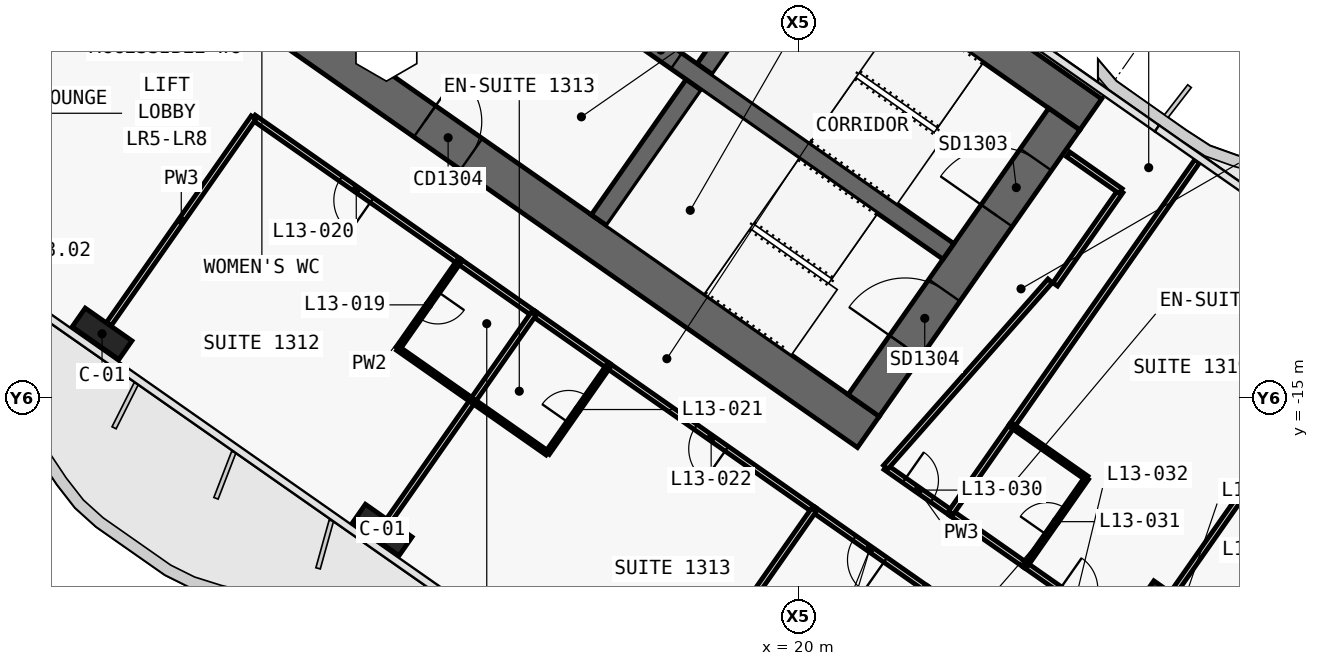
"""IFC4 building model, lengths in metres.
Left out: names, types, materials, properties, quantities, classifications, styles, units other than length and angle.
Written with IfcOpenShell. Run it as: python <this file> out.ifc"""

import sys

from ifc_helpers import new_model, si_unit, direction, frame, frame_2d, origin, origin_2d, place, context, subcontext, project, spatial, polyline, rectangle, outline, extrude, element, fill, save


model = new_model("IFC4")
c1 = context("Model", 3, precision=1e-05, world=origin(), true_north=direction((0.0, 1.0)))
c2 = subcontext(c1, "Body", "Model", "MODEL_VIEW")
j1 = project(units=[si_unit("LENGTHUNIT", "METRE"), si_unit("PLANEANGLEUNIT", "RADIAN")], contexts=[c1])
p1 = place(None, origin())
s1 = spatial("IfcSite", under=j1, at=p1, CompositionType="ELEMENT")
p2 = place(p1, origin())
s2 = spatial("IfcBuilding", under=s1, at=p2, CompositionType="ELEMENT")
p3 = place(p2, frame((0.0, 0.0, 72.5)))
s3 = spatial("IfcBuildingStorey", under=s2, at=p3, CompositionType="ELEMENT", Elevation=72.5)
p4 = place(p3, frame((-0.037, 11.867, 0.0), z_axis=(0.0, 0.0, 1.0), x_axis=(0.819155306259, -0.573571777746, 0.0)))
e1 = element("IfcWall", 1, at=p4, inside=s3, PredefinedType="SHEAR", context=c2, shape_type="SweptSolid", body=[
    extrude(outline(polyline([(33.837, 0.5), (0.0, 0.5), (0.7, -0.5), (33.837, -0.5), (33.837, 0.5)])), origin(), (0.0, 0.0, 1.0), 3.6),
])
p5 = place(p3, frame((-0.037, -0.585, 0.0), z_axis=(0.0, 0.0, 1.0), x_axis=(0.819157152511, -0.573569140985, 0.0)))
e2 = element("IfcWall", 2, at=p5, inside=s3, PredefinedType="SHEAR", context=c2, shape_type="SweptSolid", body=[
    extrude(outline(polyline([(26.695, 0.5), (0.0, 0.5), (0.7, -0.5), (26.695, -0.5), (26.695, 0.5)])), origin(), (0.0, 0.0, 1.0), 3.6),
])
p6 = place(p5, frame((1.045, 0.0, 0.0)))
e3 = element("IfcOpeningElement", 3, at=p6, cuts=e2, PredefinedType="OPENING", context=c2, shape_type="SweptSolid", body=[
    extrude(rectangle(XDim=1.5, YDim=2.1, at=frame_2d((0.75, 1.05))), frame((0.0, 0.51, 0.0), z_axis=(0.0, -1.0, 0.0), x_axis=(1.0, 0.0, 0.0)), (0.0, 0.0, 1.0), 1.02),
])
p7 = place(p5, frame((12.445, 0.0, 0.0)))
e4 = element("IfcOpeningElement", 4, at=p7, cuts=e2, PredefinedType="OPENING", context=c2, shape_type="SweptSolid", body=[
    extrude(rectangle(XDim=1.5, YDim=2.1, at=frame_2d((0.75, 1.05))), frame((0.0, 0.51, 0.0), z_axis=(0.0, -1.0, 0.0), x_axis=(1.0, 0.0, 0.0)), (0.0, 0.0, 1.0), 1.02),
])
p8 = place(p3, frame((21.708, -15.2, 0.0), z_axis=(0.0, 0.0, 1.0), x_axis=(0.573576324356, 0.819152122709, 0.0)))
e5 = element("IfcWall", 5, at=p8, inside=s3, PredefinedType="SHEAR", context=c2, shape_type="SweptSolid", body=[
    extrude(outline(polyline([(9.2, 0.5), (0.0, 0.5), (0.0, -0.5), (9.2, -0.5), (9.2, 0.5)])), origin(), (0.0, 0.0, 1.0), 3.6),
])
p9 = place(p8, frame((6.1, 0.0, 0.0)))
e6 = element("IfcOpeningElement", 6, at=p9, cuts=e5, PredefinedType="OPENING", context=c2, shape_type="SweptSolid", body=[
    extrude(rectangle(XDim=1.8, YDim=2.1, at=frame_2d((0.9, 1.05))), frame((0.0, 0.51, 0.0), z_axis=(0.0, -1.0, 0.0), x_axis=(1.0, 0.0, 0.0)), (0.0, 0.0, 1.0), 1.02),
])
p10 = place(p8, frame((1.9, 0.0, 0.0)))
e7 = element("IfcOpeningElement", 7, at=p10, cuts=e5, PredefinedType="OPENING", context=c2, shape_type="SweptSolid", body=[
    extrude(rectangle(XDim=1.8, YDim=2.1, at=frame_2d((0.9, 1.05))), frame((0.0, 0.51, 0.0), z_axis=(0.0, -1.0, 0.0), x_axis=(1.0, 0.0, 0.0)), (0.0, 0.0, 1.0), 1.02),
])
p11 = place(p3, frame((14.745, -10.324, 0.0), z_axis=(0.0, 0.0, 1.0), x_axis=(0.57356780395, 0.819158088694, 0.0)))
e8 = element("IfcWall", 8, at=p11, inside=s3, PredefinedType="SHEAR", context=c2, shape_type="SweptSolid", body=[
    extrude(outline(polyline([(0.0, 0.25), (0.0, -0.25), (4.35, -0.25), (4.35, 0.25), (0.0, 0.25)])), origin(), (0.0, 0.0, 1.0), 3.6),
])
p12 = place(p3, frame((17.527, -6.352, 0.0), z_axis=(0.0, 0.0, 1.0), x_axis=(0.573530143085, 0.819184457233, 0.0)))
e9 = element("IfcWall", 9, at=p12, inside=s3, PredefinedType="SHEAR", context=c2, shape_type="SweptSolid", body=[
    extrude(outline(polyline([(4.35, -0.25), (4.35, 0.25), (0.0, 0.25), (0.0, -0.25), (4.35, -0.25)])), origin(), (0.0, 0.0, 1.0), 3.6),
])
p13 = place(p3, frame((2.638, 3.768, 0.0), z_axis=(0.0, 0.0, 1.0), x_axis=(0.819148977158, -0.573580816643, 0.0)))
e10 = element("IfcWall", 10, at=p13, inside=s3, PredefinedType="SHEAR", context=c2, shape_type="SweptSolid", body=[
    extrude(outline(polyline([(0.0, 0.25), (0.0, -0.25), (26.0, -0.25), (26.0, 0.25), (0.0, 0.25)])), origin(), (0.0, 0.0, 1.0), 3.6),
])
p14 = place(p13, frame((9.637, 0.0, 0.0)))
e11 = element("IfcOpeningElement", 11, at=p14, cuts=e10, PredefinedType="OPENING", context=c2, shape_type="SweptSolid", body=[
    extrude(rectangle(XDim=1.2, YDim=2.1, at=frame_2d((0.6, 1.05))), frame((0.0, 0.26, 0.0), z_axis=(0.0, -1.0, 0.0), x_axis=(1.0, 0.0, 0.0)), (0.0, 0.0, 1.0), 0.52),
])
p15 = place(p13, frame((11.812, 0.0, 0.0)))
e12 = element("IfcOpeningElement", 12, at=p15, cuts=e10, PredefinedType="OPENING", context=c2, shape_type="SweptSolid", body=[
    extrude(rectangle(XDim=1.2, YDim=2.1, at=frame_2d((0.6, 1.05))), frame((0.0, 0.26, 0.0), z_axis=(0.0, -1.0, 0.0), x_axis=(1.0, 0.0, 0.0)), (0.0, 0.0, 1.0), 0.52),
])
p16 = place(p13, frame((13.988, 0.0, 0.0)))
e13 = element("IfcOpeningElement", 13, at=p16, cuts=e10, PredefinedType="OPENING", context=c2, shape_type="SweptSolid", body=[
    extrude(rectangle(XDim=1.2, YDim=2.1, at=frame_2d((0.6, 1.05))), frame((0.0, 0.26, 0.0), z_axis=(0.0, -1.0, 0.0), x_axis=(1.0, 0.0, 0.0)), (0.0, 0.0, 1.0), 0.52),
])
p17 = place(p13, frame((16.262, 0.0, 0.0)))
e14 = element("IfcOpeningElement", 14, at=p17, cuts=e10, PredefinedType="OPENING", context=c2, shape_type="SweptSolid", body=[
    extrude(rectangle(XDim=1.0, YDim=2.1, at=frame_2d((0.5, 1.05))), frame((0.0, 0.26, 0.0), z_axis=(0.0, -1.0, 0.0), x_axis=(1.0, 0.0, 0.0)), (0.0, 0.0, 1.0), 0.52),
])
for number, where, z_axis, x_axis in (
    (15, (1.665, -13.313, 0.0), (0.0, 0.0, 1.0), (0.819, -0.574, 0.0)),
    (16, (9.038, -18.475, 0.0), (0.0, 0.0, 1.0), (0.819, -0.574, 0.0)),
):
    element("IfcColumn", number, at=place(p3, frame(where, z_axis=z_axis, x_axis=x_axis)), inside=s3, PredefinedType="COLUMN", context=c2, shape_type="SweptSolid", body=[
        extrude(rectangle(XDim=1.5, YDim=0.6, at=origin_2d()), origin(), (0.0, 0.0, 1.0), 3.6),
    ])
p18 = place(p3, frame((29.49, -20.649, 0.0), z_axis=(0.0, 0.0, 1.0), x_axis=(0.819152044289, -0.573576436351, 0.0)))
e17 = element("IfcColumn", 17, at=p18, inside=s3, PredefinedType="COLUMN", context=c2, shape_type="SweptSolid", body=[
    extrude(rectangle(XDim=1.2, YDim=1.2, at=origin_2d()), origin(), (0.0, 0.0, 1.0), 3.6),
])
p19 = place(p3, frame((22.284, -16.824, 0.0), z_axis=(0.0, 0.0, 1.0), x_axis=(0.819160859995, -0.573563846013, 0.0)))
e18 = element("IfcWall", 18, at=p19, inside=s3, PredefinedType="PARTITIONING", context=c2, shape_type="SweptSolid", body=[
    extrude(rectangle(XDim=2.098, YDim=0.15, at=frame_2d((1.049, 0.0))), origin(), (0.0, 0.0, 1.0), 3.32),
])
p20 = place(p19, frame((0.599, 0.0, 0.0)))
e19 = element("IfcOpeningElement", 19, at=p20, cuts=e18, PredefinedType="OPENING", context=c2, shape_type="SweptSolid", body=[
    extrude(rectangle(XDim=0.9, YDim=2.1, at=frame_2d((0.45, 1.05))), frame((0.0, 0.085, 0.0), z_axis=(0.0, -1.0, 0.0), x_axis=(1.0, 0.0, 0.0)), (0.0, 0.0, 1.0), 0.17),
])
p21 = place(p3, frame((25.966, -19.403, 0.0), z_axis=(0.0, 0.0, 1.0), x_axis=(0.81917779803, -0.57353965444, 0.0)))
e20 = element("IfcWall", 20, at=p21, inside=s3, PredefinedType="PARTITIONING", context=c2, shape_type="SweptSolid", body=[
    extrude(rectangle(XDim=3.603, YDim=0.15, at=frame_2d((1.801, 0.0))), origin(), (0.0, 0.0, 1.0), 2.6),
])
p22 = place(p21, frame((1.101, 0.0, 0.0)))
e21 = element("IfcOpeningElement", 21, at=p22, cuts=e20, PredefinedType="OPENING", context=c2, shape_type="SweptSolid", body=[
    extrude(rectangle(XDim=1.0, YDim=2.1, at=frame_2d((0.5, 1.05))), frame((0.0, 0.085, 0.0), z_axis=(0.0, -1.0, 0.0), x_axis=(1.0, 0.0, 0.0)), (0.0, 0.0, 1.0), 0.17),
])
p23 = place(p3, frame((23.999, -18.025, 0.0), z_axis=(0.0, 0.0, 1.0), x_axis=(0.819146032251, -0.573585022335, 0.0)))
e22 = element("IfcWall", 22, at=p23, inside=s3, PredefinedType="PARTITIONING", context=c2, shape_type="SweptSolid", body=[
    extrude(rectangle(XDim=2.404, YDim=0.15, at=frame_2d((1.202, 0.0))), origin(), (0.0, 0.0, 1.0), 3.32),
])
p24 = place(p3, frame((11.059, -11.406, 0.0), z_axis=(0.0, 0.0, 1.0), x_axis=(-0.819155459934, 0.573571558274, 0.0)))
e23 = element("IfcWall", 23, at=p24, inside=s3, PredefinedType="PARTITIONING", context=c2, shape_type="SweptSolid", body=[
    extrude(rectangle(XDim=6.601, YDim=0.15, at=frame_2d((3.301, 0.0))), origin(), (0.0, 0.0, 1.0), 2.6),
])
p25 = place(p24, frame((2.801, 0.0, 0.0)))
e24 = element("IfcOpeningElement", 24, at=p25, cuts=e23, PredefinedType="OPENING", context=c2, shape_type="SweptSolid", body=[
    extrude(rectangle(XDim=1.0, YDim=2.1, at=frame_2d((0.5, 1.05))), frame((0.0, 0.085, 0.0), z_axis=(0.0, -1.0, 0.0), x_axis=(1.0, 0.0, 0.0)), (0.0, 0.0, 1.0), 0.17),
])
p26 = place(p3, frame((13.026, -12.783, 0.0), z_axis=(0.0, 0.0, 1.0), x_axis=(-0.819146032251, 0.573585022335, 0.0)))
e25 = element("IfcWall", 25, at=p26, inside=s3, PredefinedType="PARTITIONING", context=c2, shape_type="SweptSolid", body=[
    extrude(rectangle(XDim=2.404, YDim=0.15, at=frame_2d((1.202, 0.0))), origin(), (0.0, 0.0, 1.0), 2.6),
])
p27 = place(p3, frame((20.398, -17.945, 0.0), z_axis=(0.0, 0.0, 1.0), x_axis=(-0.819124209701, 0.57361618621, 0.0)))
e26 = element("IfcWall", 26, at=p27, inside=s3, PredefinedType="PARTITIONING", context=c2, shape_type="SweptSolid", body=[
    extrude(rectangle(XDim=6.603, YDim=0.15, at=frame_2d((3.302, 0.0))), origin(), (0.0, 0.0, 1.0), 2.6),
])
p28 = place(p27, frame((2.802, 0.0, 0.0)))
e27 = element("IfcOpeningElement", 27, at=p28, cuts=e26, PredefinedType="OPENING", context=c2, shape_type="SweptSolid", body=[
    extrude(rectangle(XDim=1.0, YDim=2.1, at=frame_2d((0.5, 1.05))), frame((0.0, 0.085, 0.0), z_axis=(0.0, -1.0, 0.0), x_axis=(1.0, 0.0, 0.0)), (0.0, 0.0, 1.0), 0.17),
])
p29 = place(p3, frame((14.992, -14.16, 0.0), z_axis=(0.0, 0.0, 1.0), x_axis=(-0.819146032251, 0.573585022335, 0.0)))
e28 = element("IfcWall", 28, at=p29, inside=s3, PredefinedType="PARTITIONING", context=c2, shape_type="SweptSolid", body=[
    extrude(rectangle(XDim=2.404, YDim=0.15, at=frame_2d((1.202, 0.0))), origin(), (0.0, 0.0, 1.0), 2.6),
])
p30 = place(p3, frame((23.346, -20.01, 0.0), z_axis=(0.0, 0.0, 1.0), x_axis=(-0.819145961204, 0.573585123798, 0.0)))
e29 = element("IfcWall", 29, at=p30, inside=s3, PredefinedType="PARTITIONING", context=c2, shape_type="SweptSolid", body=[
    extrude(rectangle(XDim=3.603, YDim=0.15, at=frame_2d((1.802, 0.0))), origin(), (0.0, 0.0, 1.0), 2.6),
])
p31 = place(p30, frame((1.301, 0.0, 0.0)))
e30 = element("IfcOpeningElement", 30, at=p31, cuts=e29, PredefinedType="OPENING", context=c2, shape_type="SweptSolid", body=[
    extrude(rectangle(XDim=1.0, YDim=2.1, at=frame_2d((0.5, 1.05))), frame((0.0, 0.085, 0.0), z_axis=(0.0, -1.0, 0.0), x_axis=(1.0, 0.0, 0.0)), (0.0, 0.0, 1.0), 0.17),
])
p32 = place(p3, frame((30.482, -8.77, 0.0), z_axis=(0.0, 0.0, 1.0), x_axis=(-0.573576058406, -0.819152308929, 0.0)))
e31 = element("IfcWall", 31, at=p32, inside=s3, PredefinedType="PARTITIONING", context=c2, shape_type="SweptSolid", body=[
    extrude(rectangle(XDim=8.501, YDim=0.15, at=frame_2d((4.25, 0.0))), origin(), (0.0, 0.0, 1.0), 2.6),
])
p33 = place(p3, frame((25.608, -15.731, 0.0), z_axis=(0.0, 0.0, 1.0), x_axis=(-0.573596837309, -0.819137759006, 0.0)))
e32 = element("IfcWall", 32, at=p33, inside=s3, PredefinedType="PARTITIONING", context=c2, shape_type="SweptSolid", body=[
    extrude(rectangle(XDim=2.802, YDim=0.15, at=frame_2d((1.401, 0.0))), origin(), (0.0, 0.0, 1.0), 2.6),
])
p34 = place(p3, frame((22.285, -16.825, 0.0), z_axis=(0.0, 0.0, 1.0), x_axis=(0.661551268245, 0.749899939647, 0.0)))
e33 = element("IfcWall", 33, at=p34, inside=s3, PredefinedType="PARTITIONING", context=c2, shape_type="SweptSolid", body=[
    extrude(rectangle(XDim=6.541, YDim=0.15, at=frame_2d((3.271, 0.0))), origin(), (0.0, 0.0, 1.0), 2.6),
])
p35 = place(p3, frame((26.746, -12.014, 0.0), z_axis=(0.0, 0.0, 1.0), x_axis=(0.573560650686, 0.819163097304, 0.0)))
e34 = element("IfcWall", 34, at=p35, inside=s3, PredefinedType="PARTITIONING", context=c2, shape_type="SweptSolid", body=[
    extrude(rectangle(XDim=3.0, YDim=0.15, at=frame_2d((1.5, 0.0))), origin(), (0.0, 0.0, 1.0), 3.32),
])
p36 = place(p3, frame((28.467, -9.556, 0.0), z_axis=(0.0, 0.0, 1.0), x_axis=(-0.819109000826, 0.573637903879, 0.0)))
e35 = element("IfcWall", 35, at=p36, inside=s3, PredefinedType="PARTITIONING", context=c2, shape_type="SweptSolid", body=[
    extrude(rectangle(XDim=1.68, YDim=0.15, at=frame_2d((0.84, 0.0))), origin(), (0.0, 0.0, 1.0), 3.32),
])
p37 = place(p3, frame((25.968, -19.404, 0.0), z_axis=(0.0, 0.0, 1.0), x_axis=(0.573591086599, 0.819141785879, 0.0)))
e36 = element("IfcWall", 36, at=p37, inside=s3, PredefinedType="PARTITIONING", context=c2, shape_type="SweptSolid", body=[
    extrude(rectangle(XDim=2.8, YDim=0.12, at=frame_2d((1.4, 0.0))), origin(), (0.0, 0.0, 1.0), 2.6),
])
p38 = place(p37, frame((0.975, 0.0, 0.0)))
e37 = element("IfcOpeningElement", 37, at=p38, cuts=e36, PredefinedType="OPENING", context=c2, shape_type="SweptSolid", body=[
    extrude(rectangle(XDim=0.85, YDim=2.05, at=frame_2d((0.425, 1.025))), frame((0.0, 0.07, 0.0), z_axis=(0.0, -1.0, 0.0), x_axis=(1.0, 0.0, 0.0)), (0.0, 0.0, 1.0), 0.14),
])
p39 = place(p3, frame((27.573, -17.109, 0.0), z_axis=(0.0, 0.0, 1.0), x_axis=(-0.819107643868, 0.573639841501, 0.0)))
e38 = element("IfcWall", 38, at=p39, inside=s3, PredefinedType="PARTITIONING", context=c2, shape_type="SweptSolid", body=[
    extrude(rectangle(XDim=2.4, YDim=0.12, at=frame_2d((1.2, 0.0))), origin(), (0.0, 0.0, 1.0), 3.32),
])
p40 = place(p3, frame((35.013, -12.76, 0.0), z_axis=(0.0, 0.0, 1.0), x_axis=(-0.573558725113, -0.819164445546, 0.0)))
e39 = element("IfcWall", 39, at=p40, inside=s3, PredefinedType="PARTITIONING", context=c2, shape_type="SweptSolid", body=[
    extrude(rectangle(XDim=9.01, YDim=0.15, at=frame_2d((4.505, 0.0))), origin(), (0.0, 0.0, 1.0), 2.6),
])
p41 = place(p3, frame((11.057, -11.405, 0.0), z_axis=(0.0, 0.0, 1.0), x_axis=(-0.573591086599, -0.819141785879, 0.0)))
e40 = element("IfcWall", 40, at=p41, inside=s3, PredefinedType="PARTITIONING", context=c2, shape_type="SweptSolid", body=[
    extrude(rectangle(XDim=2.8, YDim=0.12, at=frame_2d((1.4, 0.0))), origin(), (0.0, 0.0, 1.0), 3.32),
])
p42 = place(p41, frame((0.975, 0.0, 0.0)))
e41 = element("IfcOpeningElement", 41, at=p42, cuts=e40, PredefinedType="OPENING", context=c2, shape_type="SweptSolid", body=[
    extrude(rectangle(XDim=0.85, YDim=2.05, at=frame_2d((0.425, 1.025))), frame((0.0, 0.07, 0.0), z_axis=(0.0, -1.0, 0.0), x_axis=(1.0, 0.0, 0.0)), (0.0, 0.0, 1.0), 0.14),
])
p43 = place(p3, frame((9.451, -13.7, 0.0), z_axis=(0.0, 0.0, 1.0), x_axis=(0.819141114317, -0.573592045652, 0.0)))
e42 = element("IfcWall", 42, at=p43, inside=s3, PredefinedType="PARTITIONING", context=c2, shape_type="SweptSolid", body=[
    extrude(rectangle(XDim=2.4, YDim=0.12, at=frame_2d((1.2, 0.0))), origin(), (0.0, 0.0, 1.0), 2.6),
])
p44 = place(p3, frame((11.417, -15.076, 0.0), z_axis=(0.0, 0.0, 1.0), x_axis=(-0.573594994199, -0.819139049631, 0.0)))
e43 = element("IfcWall", 43, at=p44, inside=s3, PredefinedType="PARTITIONING", context=c2, shape_type="SweptSolid", body=[
    extrude(rectangle(XDim=3.829, YDim=0.15, at=frame_2d((1.915, 0.0))), origin(), (0.0, 0.0, 1.0), 2.6),
])
p45 = place(p3, frame((1.849, -13.051, 0.0), z_axis=(0.0, 0.0, 1.0), x_axis=(0.57357355307, 0.819154063177, 0.0)))
e44 = element("IfcWall", 44, at=p45, inside=s3, PredefinedType="PARTITIONING", context=c2, shape_type="SweptSolid", body=[
    extrude(rectangle(XDim=6.63, YDim=0.15, at=frame_2d((3.315, 0.0))), origin(), (0.0, 0.0, 1.0), 2.6),
])
p46 = place(p3, frame((13.024, -12.782, 0.0), z_axis=(0.0, 0.0, 1.0), x_axis=(-0.573550118428, -0.819170471667, 0.0)))
e45 = element("IfcWall", 45, at=p46, inside=s3, PredefinedType="PARTITIONING", context=c2, shape_type="SweptSolid", body=[
    extrude(rectangle(XDim=2.8, YDim=0.15, at=frame_2d((1.4, 0.0))), origin(), (0.0, 0.0, 1.0), 2.6),
])
p47 = place(p3, frame((11.417, -15.076, 0.0), z_axis=(0.0, 0.0, 1.0), x_axis=(0.819155442668, -0.573571582932, 0.0)))
e46 = element("IfcWall", 46, at=p47, inside=s3, PredefinedType="PARTITIONING", context=c2, shape_type="SweptSolid", body=[
    extrude(rectangle(XDim=2.4, YDim=0.12, at=frame_2d((1.2, 0.0))), origin(), (0.0, 0.0, 1.0), 2.6),
])
p48 = place(p3, frame((13.385, -16.453, 0.0), z_axis=(0.0, 0.0, 1.0), x_axis=(0.573550118428, 0.819170471667, 0.0)))
e47 = element("IfcWall", 47, at=p48, inside=s3, PredefinedType="PARTITIONING", context=c2, shape_type="SweptSolid", body=[
    extrude(rectangle(XDim=2.8, YDim=0.12, at=frame_2d((1.4, 0.0))), origin(), (0.0, 0.0, 1.0), 3.32),
])
p49 = place(p48, frame((0.975, 0.0, 0.0)))
e48 = element("IfcOpeningElement", 48, at=p49, cuts=e47, PredefinedType="OPENING", context=c2, shape_type="SweptSolid", body=[
    extrude(rectangle(XDim=0.85, YDim=2.05, at=frame_2d((0.425, 1.025))), frame((0.0, 0.07, 0.0), z_axis=(0.0, -1.0, 0.0), x_axis=(1.0, 0.0, 0.0)), (0.0, 0.0, 1.0), 0.14),
])
p50 = place(p3, frame((20.396, -17.944, 0.0), z_axis=(0.0, 0.0, 1.0), x_axis=(-0.57359826181, -0.819136761505, 0.0)))
e49 = element("IfcWall", 49, at=p50, inside=s3, PredefinedType="PARTITIONING", context=c2, shape_type="SweptSolid", body=[
    extrude(rectangle(XDim=6.63, YDim=0.15, at=frame_2d((3.315, 0.0))), origin(), (0.0, 0.0, 1.0), 2.6),
])
p51 = place(p17, origin())
e50 = element("IfcDoor", 50, at=p51, inside=s3, OperationType="SINGLE_SWING_RIGHT", PredefinedType="DOOR", context=c2, shape_type="SweptSolid", body=[
    extrude(rectangle(XDim=1.0, YDim=2.1, at=frame_2d((0.5, 1.05))), frame((0.0, 0.025, 0.0), z_axis=(0.0, -1.0, 0.0), x_axis=(1.0, 0.0, 0.0)), (0.0, 0.0, 1.0), 0.05),
])
fill(e14, e50)
p52 = place(p7, origin())
e51 = element("IfcDoor", 51, at=p52, inside=s3, OperationType="DOUBLE_DOOR_SINGLE_SWING", PredefinedType="DOOR", context=c2, shape_type="SweptSolid", body=[
    extrude(rectangle(XDim=1.5, YDim=2.1, at=frame_2d((0.75, 1.05))), frame((0.0, 0.025, 0.0), z_axis=(0.0, -1.0, 0.0), x_axis=(1.0, 0.0, 0.0)), (0.0, 0.0, 1.0), 0.05),
])
fill(e4, e51)
p53 = place(p9, origin())
e52 = element("IfcDoor", 52, at=p53, inside=s3, OperationType="DOUBLE_DOOR_SINGLE_SWING", PredefinedType="DOOR", context=c2, shape_type="SweptSolid", body=[
    extrude(rectangle(XDim=1.8, YDim=2.1, at=frame_2d((0.9, 1.05))), frame((0.0, 0.025, 0.0), z_axis=(0.0, -1.0, 0.0), x_axis=(1.0, 0.0, 0.0)), (0.0, 0.0, 1.0), 0.05),
])
fill(e6, e52)
p54 = place(p10, origin())
e53 = element("IfcDoor", 53, at=p54, inside=s3, OperationType="DOUBLE_DOOR_SINGLE_SWING", PredefinedType="DOOR", context=c2, shape_type="SweptSolid", body=[
    extrude(rectangle(XDim=1.8, YDim=2.1, at=frame_2d((0.9, 1.05))), frame((0.0, 0.025, 0.0), z_axis=(0.0, -1.0, 0.0), x_axis=(1.0, 0.0, 0.0)), (0.0, 0.0, 1.0), 0.05),
])
fill(e7, e53)
p55 = place(p42, origin())
e54 = element("IfcDoor", 54, at=p55, inside=s3, OperationType="SINGLE_SWING_LEFT", PredefinedType="DOOR", context=c2, shape_type="SweptSolid", body=[
    extrude(rectangle(XDim=0.85, YDim=2.05, at=frame_2d((0.425, 1.025))), frame((0.0, 0.025, 0.0), z_axis=(0.0, -1.0, 0.0), x_axis=(1.0, 0.0, 0.0)), (0.0, 0.0, 1.0), 0.05),
])
fill(e41, e54)
p56 = place(p25, origin())
e55 = element("IfcDoor", 55, at=p56, inside=s3, OperationType="SINGLE_SWING_LEFT", PredefinedType="DOOR", context=c2, shape_type="SweptSolid", body=[
    extrude(rectangle(XDim=1.0, YDim=2.1, at=frame_2d((0.5, 1.05))), frame((0.0, 0.025, 0.0), z_axis=(0.0, -1.0, 0.0), x_axis=(1.0, 0.0, 0.0)), (0.0, 0.0, 1.0), 0.05),
])
fill(e24, e55)
p57 = place(p49, origin())
e56 = element("IfcDoor", 56, at=p57, inside=s3, OperationType="SINGLE_SWING_LEFT", PredefinedType="DOOR", context=c2, shape_type="SweptSolid", body=[
    extrude(rectangle(XDim=0.85, YDim=2.05, at=frame_2d((0.425, 1.025))), frame((0.0, 0.025, 0.0), z_axis=(0.0, -1.0, 0.0), x_axis=(1.0, 0.0, 0.0)), (0.0, 0.0, 1.0), 0.05),
])
fill(e48, e56)
p58 = place(p28, origin())
e57 = element("IfcDoor", 57, at=p58, inside=s3, OperationType="SINGLE_SWING_LEFT", PredefinedType="DOOR", context=c2, shape_type="SweptSolid", body=[
    extrude(rectangle(XDim=1.0, YDim=2.1, at=frame_2d((0.5, 1.05))), frame((0.0, 0.025, 0.0), z_axis=(0.0, -1.0, 0.0), x_axis=(1.0, 0.0, 0.0)), (0.0, 0.0, 1.0), 0.05),
])
fill(e27, e57)
p59 = place(p31, origin())
e58 = element("IfcDoor", 58, at=p59, inside=s3, OperationType="SINGLE_SWING_RIGHT", PredefinedType="DOOR", context=c2, shape_type="SweptSolid", body=[
    extrude(rectangle(XDim=1.0, YDim=2.1, at=frame_2d((0.5, 1.05))), frame((0.0, 0.025, 0.0), z_axis=(0.0, -1.0, 0.0), x_axis=(1.0, 0.0, 0.0)), (0.0, 0.0, 1.0), 0.05),
])
fill(e30, e58)
p60 = place(p20, origin())
e59 = element("IfcDoor", 59, at=p60, inside=s3, OperationType="SINGLE_SWING_RIGHT", PredefinedType="DOOR", context=c2, shape_type="SweptSolid", body=[
    extrude(rectangle(XDim=0.9, YDim=2.1, at=frame_2d((0.45, 1.05))), frame((0.0, 0.025, 0.0), z_axis=(0.0, -1.0, 0.0), x_axis=(1.0, 0.0, 0.0)), (0.0, 0.0, 1.0), 0.05),
])
fill(e19, e59)
p61 = place(p38, origin())
e60 = element("IfcDoor", 60, at=p61, inside=s3, OperationType="SINGLE_SWING_LEFT", PredefinedType="DOOR", context=c2, shape_type="SweptSolid", body=[
    extrude(rectangle(XDim=0.85, YDim=2.05, at=frame_2d((0.425, 1.025))), frame((0.0, 0.025, 0.0), z_axis=(0.0, -1.0, 0.0), x_axis=(1.0, 0.0, 0.0)), (0.0, 0.0, 1.0), 0.05),
])
fill(e37, e60)
save(model, sys.argv[1])
